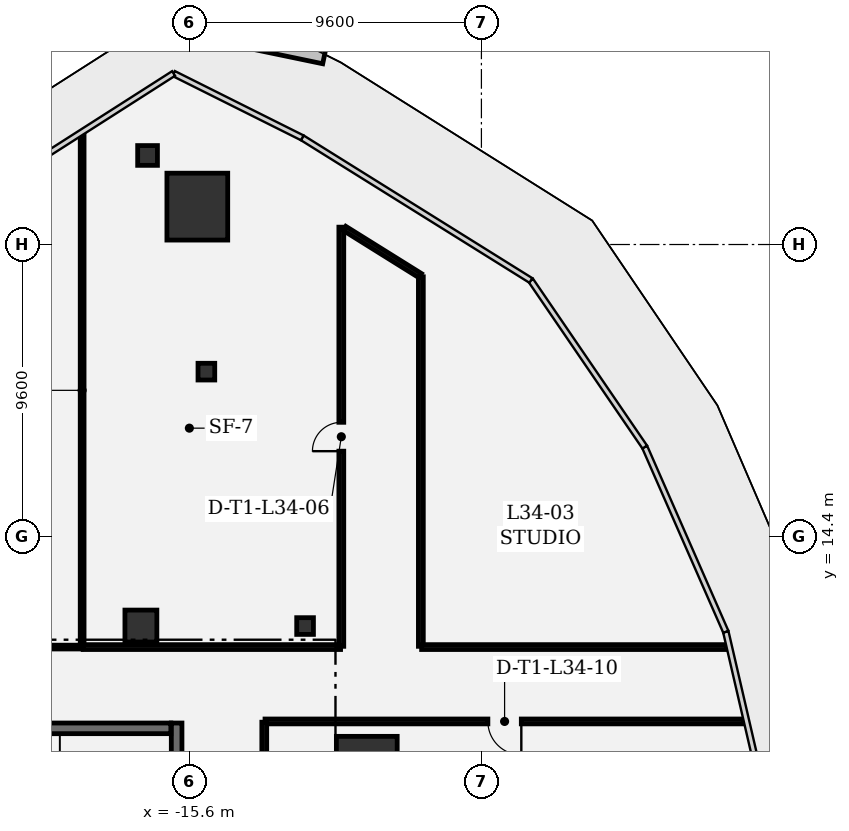
"""IFC4 building model, lengths in metres.
Left out: names, types, materials, properties, quantities, classifications, styles, units other than length and angle.
Written with IfcOpenShell. Run it as: python <this file> out.ifc"""

import sys

from ifc_helpers import new_model, si_unit, direction, frame, frame_2d, origin, origin_2d, place, context, subcontext, project, spatial, rectangle, extrude, element, fill, save


model = new_model("IFC4")
c1 = context("Model", 3, precision=1e-05, world=origin(), true_north=direction((0.0, 1.0)))
c2 = subcontext(c1, "Body", "Model", "MODEL_VIEW")
j1 = project(units=[si_unit("LENGTHUNIT", "METRE"), si_unit("PLANEANGLEUNIT", "RADIAN")], contexts=[c1])
p1 = place(None, origin())
s1 = spatial("IfcSite", under=j1, at=p1, CompositionType="ELEMENT")
p2 = place(p1, origin())
s2 = spatial("IfcBuilding", under=s1, at=p2, CompositionType="ELEMENT")
p3 = place(p2, frame((0.0, 0.0, 150.3)))
s3 = spatial("IfcBuildingStorey", under=s2, at=p3, CompositionType="ELEMENT", Elevation=150.3)
for number, where, z_axis, x_axis in (
    (1, (-9.77, 6.721, 0.0), (0.0, 0.0, 1.0), (1.0, 0.0, 0.0)),
    (2, (-15.344, 25.246, 0.0), (0.0, 0.0, 1.0), (1.0, 0.0, 0.0)),
):
    element("IfcColumn", number, at=place(p3, frame(where, z_axis=z_axis, x_axis=x_axis)), inside=s3, PredefinedType="COLUMN", context=c2, shape_type="SweptSolid", body=[
        extrude(rectangle(XDim=2.0, YDim=2.2, at=origin_2d()), origin(), (0.0, 0.0, 1.0), 4.05),
    ])
p4 = place(p3, frame((-17.2, 11.45, 0.0), z_axis=(0.0, 0.0, 1.0), x_axis=(1.0, 0.0, 0.0)))
e3 = element("IfcColumn", 3, at=p4, inside=s3, PredefinedType="COLUMN", context=c2, shape_type="SweptSolid", body=[
    extrude(rectangle(XDim=1.05, YDim=1.05, at=origin_2d()), origin(), (0.0, 0.0, 1.0), 4.05),
])
p5 = place(p3, frame((-16.981, 26.929, 0.0), z_axis=(0.0, 0.0, 1.0), x_axis=(1.0, 0.0, 0.0)))
e4 = element("IfcColumn", 4, at=p5, inside=s3, PredefinedType="COLUMN", context=c2, shape_type="SweptSolid", body=[
    extrude(rectangle(XDim=0.65, YDim=0.65, at=origin_2d()), origin(), (0.0, 0.0, 1.0), 4.05),
])
for number, where, z_axis, x_axis in (
    (5, (-15.046, 19.818, 0.0), (0.0, 0.0, 1.0), (1.0, 0.0, 0.0)),
    (6, (-11.8, 11.45, 0.0), (0.0, 0.0, 1.0), (1.0, 0.0, 0.0)),
):
    element("IfcColumn", number, at=place(p3, frame(where, z_axis=z_axis, x_axis=x_axis)), inside=s3, PredefinedType="COLUMN", context=c2, shape_type="SweptSolid", body=[
        extrude(rectangle(XDim=0.55, YDim=0.55, at=origin_2d()), origin(), (0.0, 0.0, 1.0), 4.05),
    ])
p6 = place(p3, frame((-16.025, 4.05, 0.0), z_axis=(0.0, 0.0, 1.0), x_axis=(0.0, 1.0, 0.0)))
e7 = element("IfcWall", 7, at=p6, inside=s3, PredefinedType="SHEAR", context=c2, shape_type="SweptSolid", body=[
    extrude(rectangle(XDim=4.21, YDim=0.35, at=frame_2d((2.105, 0.0))), origin(), (0.0, 0.0, 1.0), 3.78),
])
p7 = place(p3, frame((-16.215, 8.085, 0.0), z_axis=(0.0, 0.0, 1.0), x_axis=(-1.0, 0.0, 0.0)))
e8 = element("IfcWall", 8, at=p7, inside=s3, PredefinedType="SHEAR", context=c2, shape_type="SweptSolid", body=[
    extrude(rectangle(XDim=8.12, YDim=0.35, at=frame_2d((4.06, 0.0))), origin(), (0.0, 0.0, 1.0), 3.78),
])
p8 = place(p7, frame((6.74, 0.0, 0.0)))
e9 = element("IfcOpeningElement", 9, at=p8, cuts=e8, PredefinedType="OPENING", context=c2, shape_type="SweptSolid", body=[
    extrude(rectangle(XDim=1.1, YDim=2.2, at=frame_2d((0.55, 1.1))), frame((0.0, 0.185, 0.0), z_axis=(0.0, -1.0, 0.0), x_axis=(1.0, 0.0, 0.0)), (0.0, 0.0, 1.0), 0.37),
])
p9 = place(p3, frame((-33.917, 10.758, 0.0), z_axis=(0.0, 0.0, 1.0), x_axis=(1.0, 0.0, 0.0)))
e10 = element("IfcWall", 10, at=p9, inside=s3, PredefinedType="PARTITIONING", context=c2, shape_type="SweptSolid", body=[
    extrude(rectangle(XDim=14.759, YDim=0.125, at=frame_2d((7.379, 0.0))), origin(), (0.0, 0.0, 1.0), 3.78),
])
p10 = place(p9, frame((6.905, 0.0, 0.0)))
e11 = element("IfcOpeningElement", 11, at=p10, cuts=e10, PredefinedType="OPENING", context=c2, shape_type="SweptSolid", body=[
    extrude(rectangle(XDim=0.95, YDim=2.15, at=frame_2d((0.475, 1.075))), frame((0.0, 0.073, 0.0), z_axis=(0.0, -1.0, 0.0), x_axis=(1.0, 0.0, 0.0)), (0.0, 0.0, 1.0), 0.145),
])
p11 = place(p3, frame((-19.133, 10.783, 0.0), z_axis=(0.0, 0.0, 1.0), x_axis=(0.0, 1.0, 0.0)))
e12 = element("IfcWall", 12, at=p11, inside=s3, PredefinedType="PARTITIONING", context=c2, shape_type="SweptSolid", body=[
    extrude(rectangle(XDim=16.84, YDim=0.125, at=frame_2d((8.42, 0.0))), origin(), (0.0, 0.0, 1.0), 2.895),
])
p12 = place(p3, frame((-19.1, 10.758, 0.0), z_axis=(0.0, 0.0, 1.0), x_axis=(1.0, 0.0, 0.0)))
e13 = element("IfcWall", 13, at=p12, inside=s3, PredefinedType="PARTITIONING", context=c2, shape_type="SweptSolid", body=[
    extrude(rectangle(XDim=8.467, YDim=0.16, at=frame_2d((4.233, 0.0))), origin(), (0.0, 0.0, 1.0), 2.895),
])
p13 = place(p3, frame((-10.608, 10.783, 0.0), z_axis=(0.0, 0.0, 1.0), x_axis=(0.0, 1.0, 0.0)))
e14 = element("IfcWall", 14, at=p13, inside=s3, PredefinedType="PARTITIONING", context=c2, shape_type="SweptSolid", body=[
    extrude(rectangle(XDim=13.788, YDim=0.16, at=frame_2d((6.894, 0.0))), origin(), (0.0, 0.0, 1.0), 2.9),
])
p14 = place(p13, frame((6.419, 0.0, 0.0)))
e15 = element("IfcOpeningElement", 15, at=p14, cuts=e14, PredefinedType="OPENING", context=c2, shape_type="SweptSolid", body=[
    extrude(rectangle(XDim=0.95, YDim=2.15, at=frame_2d((0.475, 1.075))), frame((0.0, 0.09, 0.0), z_axis=(0.0, -1.0, 0.0), x_axis=(1.0, 0.0, 0.0)), (0.0, 0.0, 1.0), 0.18),
])
p15 = place(p3, frame((-8.013, 22.977, 0.0), z_axis=(0.0, 0.0, 1.0), x_axis=(-0.848358146003, 0.529422757454, 0.0)))
e16 = element("IfcWall", 16, at=p15, inside=s3, PredefinedType="PARTITIONING", context=c2, shape_type="SweptSolid", body=[
    extrude(rectangle(XDim=2.933, YDim=0.16, at=frame_2d((1.467, 0.0))), origin(), (0.0, 0.0, 1.0), 3.78),
])
p16 = place(p3, frame((-7.992, 10.783, 0.0), z_axis=(0.0, 0.0, 1.0), x_axis=(0.0, 1.0, 0.0)))
e17 = element("IfcWall", 17, at=p16, inside=s3, PredefinedType="PARTITIONING", context=c2, shape_type="SweptSolid", body=[
    extrude(rectangle(XDim=12.155, YDim=0.16, at=frame_2d((6.078, 0.0))), origin(), (0.0, 0.0, 1.0), 3.78),
])
p17 = place(p3, frame((-7.967, 10.758, 0.0), z_axis=(0.0, 0.0, 1.0), x_axis=(1.0, 0.0, 0.0)))
e18 = element("IfcWall", 18, at=p17, inside=s3, PredefinedType="PARTITIONING", context=c2, shape_type="SweptSolid", body=[
    extrude(rectangle(XDim=10.042, YDim=0.16, at=frame_2d((5.021, 0.0))), origin(), (0.0, 0.0, 1.0), 3.78),
])
p18 = place(p3, frame((2.642, 8.312, 0.0), z_axis=(0.0, 0.0, 1.0), x_axis=(-1.0, 0.0, 0.0)))
e19 = element("IfcWall", 19, at=p18, inside=s3, PredefinedType="PARTITIONING", context=c2, shape_type="SweptSolid", body=[
    extrude(rectangle(XDim=15.759, YDim=0.16, at=frame_2d((7.88, 0.0))), origin(), (0.0, 0.0, 1.0), 2.895),
])
p19 = place(p18, frame((7.33, 0.0, 0.0)))
e20 = element("IfcOpeningElement", 20, at=p19, cuts=e19, PredefinedType="OPENING", context=c2, shape_type="SweptSolid", body=[
    extrude(rectangle(XDim=1.1, YDim=2.15, at=frame_2d((0.55, 1.075))), frame((0.0, 0.09, 0.0), z_axis=(0.0, -1.0, 0.0), x_axis=(1.0, 0.0, 0.0)), (0.0, 0.0, 1.0), 0.18),
])
p20 = place(p3, frame((-13.142, 8.287, 0.0), z_axis=(0.0, 0.0, 1.0), x_axis=(0.0, -1.0, 0.0)))
e21 = element("IfcWall", 21, at=p20, inside=s3, PredefinedType="PARTITIONING", context=c2, shape_type="SweptSolid", body=[
    extrude(rectangle(XDim=7.002, YDim=0.16, at=frame_2d((3.501, 0.0))), origin(), (0.0, 0.0, 1.0), 3.78),
])
p21 = place(p14, origin())
e22 = element("IfcDoor", 22, at=p21, inside=s3, OperationType="SINGLE_SWING_LEFT", PredefinedType="DOOR", context=c2, shape_type="SweptSolid", body=[
    extrude(rectangle(XDim=0.95, YDim=2.15, at=frame_2d((0.475, 1.075))), frame((0.0, 0.025, 0.0), z_axis=(0.0, -1.0, 0.0), x_axis=(1.0, 0.0, 0.0)), (0.0, 0.0, 1.0), 0.05),
])
fill(e15, e22)
p22 = place(p19, origin())
e23 = element("IfcDoor", 23, at=p22, inside=s3, OperationType="SINGLE_SWING_LEFT", PredefinedType="DOOR", context=c2, shape_type="SweptSolid", body=[
    extrude(rectangle(XDim=1.1, YDim=2.15, at=frame_2d((0.55, 1.075))), frame((0.0, 0.025, 0.0), z_axis=(0.0, -1.0, 0.0), x_axis=(1.0, 0.0, 0.0)), (0.0, 0.0, 1.0), 0.05),
])
fill(e20, e23)
save(model, sys.argv[1])
